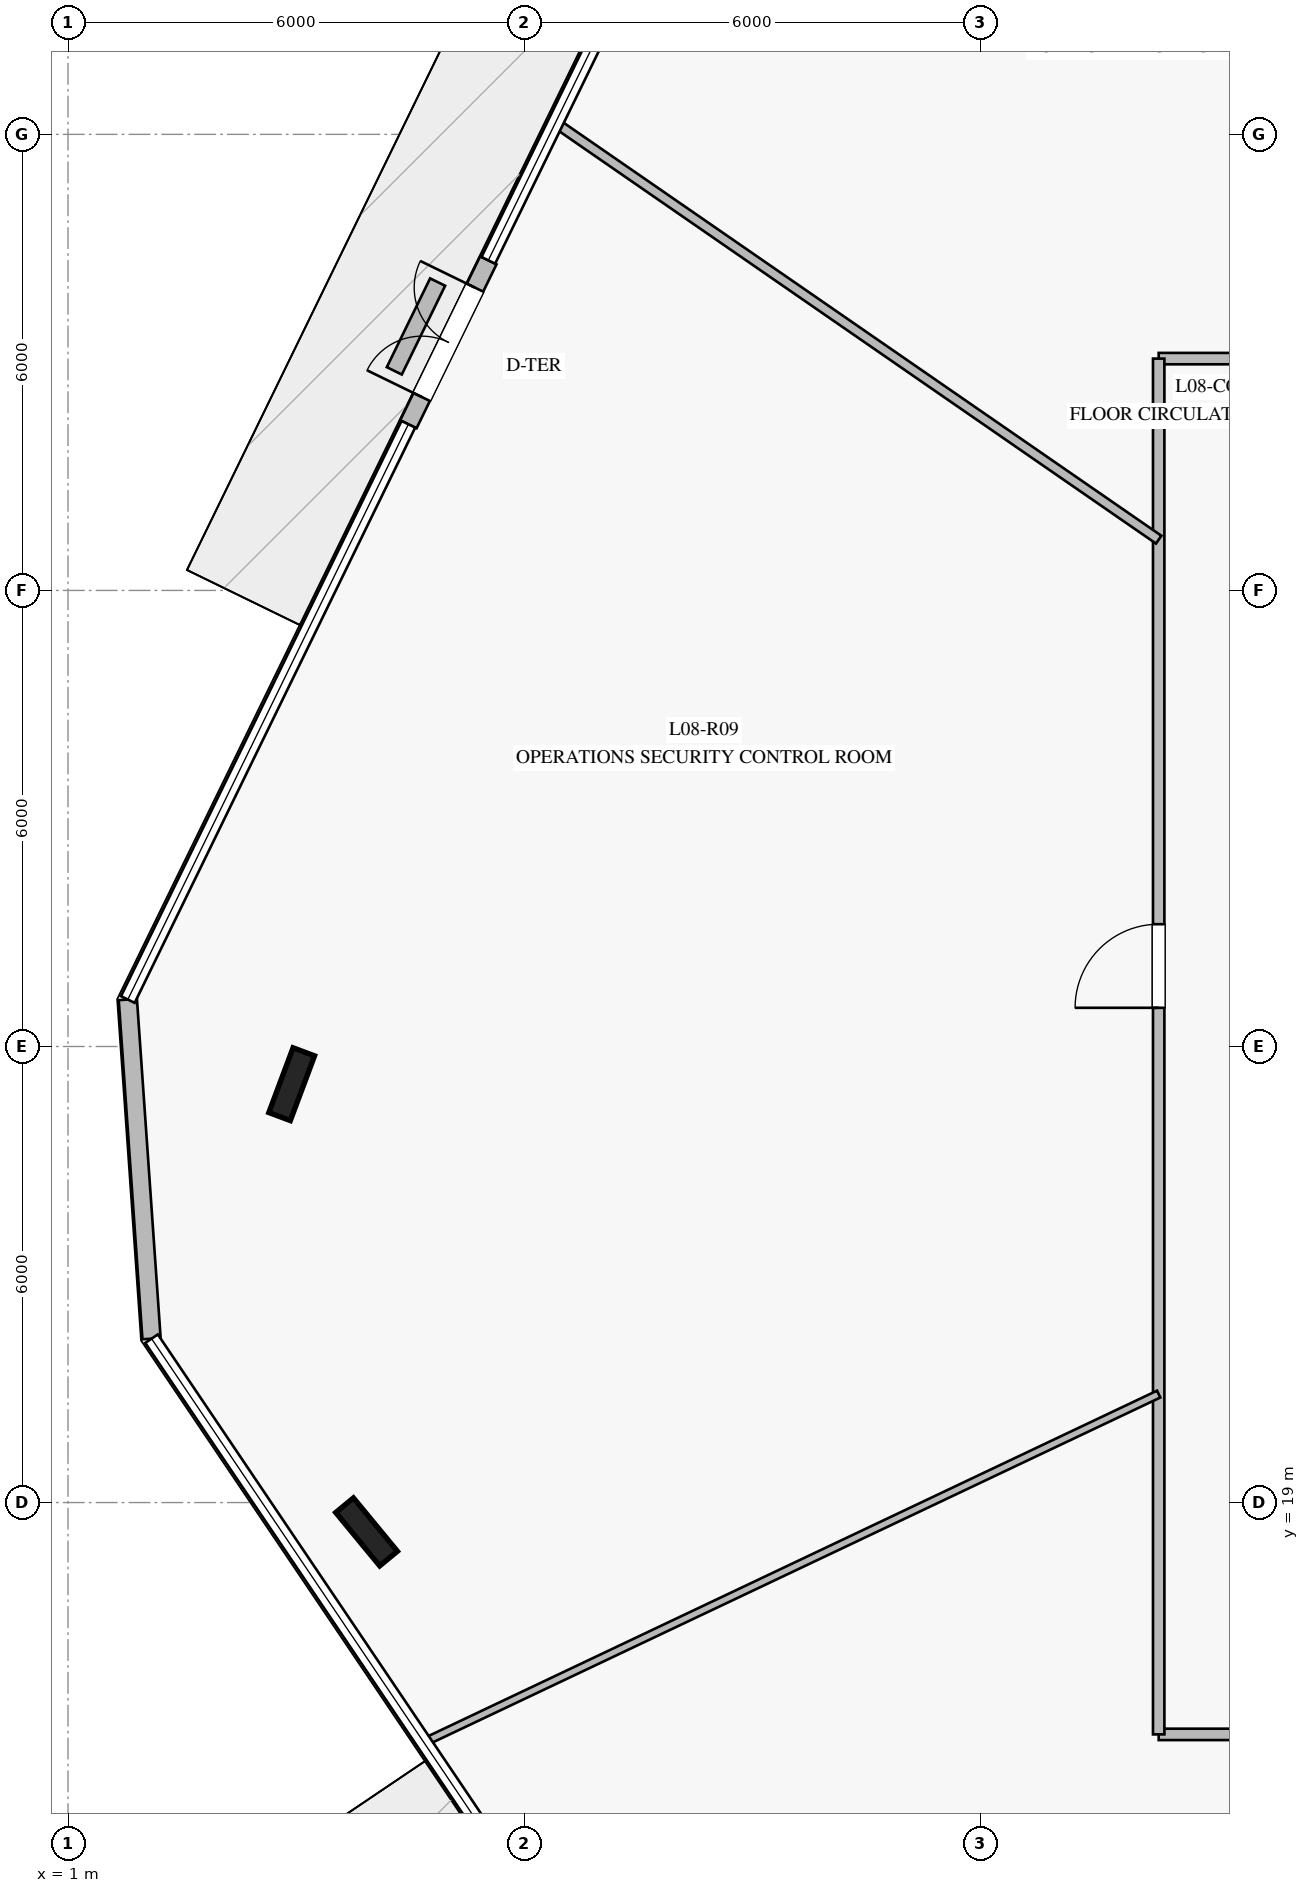
"""IFC4 building model, lengths in metres.
Left out: names, types, materials, properties, quantities, classifications, styles, units other than length and angle.
Written with IfcOpenShell. Run it as: python <this file> out.ifc"""

import sys

from ifc_helpers import new_model, si_unit, direction, frame, frame_2d, origin, origin_2d, place, context, subcontext, project, spatial, rectangle, i_section, extrude, element, fill, save


model = new_model("IFC4")
c1 = context("Model", 3, precision=1e-05, world=origin(), true_north=direction((0.0, 1.0)))
c2 = subcontext(c1, "Body", "Model", "MODEL_VIEW")
j1 = project(units=[si_unit("LENGTHUNIT", "METRE"), si_unit("PLANEANGLEUNIT", "RADIAN")], contexts=[c1])
p1 = place(None, origin())
s1 = spatial("IfcSite", under=j1, at=p1, CompositionType="ELEMENT")
p2 = place(p1, origin())
s2 = spatial("IfcBuilding", under=s1, at=p2, CompositionType="ELEMENT")
p3 = place(p2, frame((0.0, 0.0, 36.0)))
s3 = spatial("IfcBuildingStorey", under=s2, at=p3, CompositionType="ELEMENT", Elevation=36.0)
for number, where, z_axis, x_axis in (
    (1, (3.943, 24.504, 0.0), (0.0, 0.0, 1.0), (0.35, 0.937, 0.0)),
    (2, (4.928, 18.614, 0.0), (0.0, 0.0, 1.0), (-0.636, 0.772, 0.0)),
):
    element("IfcColumn", number, at=place(p3, frame(where, z_axis=z_axis, x_axis=x_axis)), inside=s3, PredefinedType="COLUMN", context=c2, shape_type="SweptSolid", body=[
        extrude(i_section(OverallWidth=0.302, OverallDepth=0.91, WebThickness=0.021, FlangeThickness=0.04, at=origin_2d()), origin(), (0.0, 0.0, 1.0), 4.0),
    ])
p4 = place(p3, frame((6.53, 35.343, 0.0), z_axis=(0.0, 0.0, 1.0), x_axis=(-0.438361496965, -0.898798752769, 0.0)))
e3 = element("IfcWall", 3, at=p4, inside=s3, PredefinedType="STANDARD", context=c2, shape_type="SweptSolid", body=[
    extrude(rectangle(XDim=2.4, YDim=0.24, at=frame_2d((1.2, 0.0))), origin(), (0.0, 0.0, 1.0), 3.76),
])
p5 = place(p4, frame((0.4, 0.0, 0.0)))
e4 = element("IfcOpeningElement", 4, at=p5, cuts=e3, PredefinedType="OPENING", context=c2, shape_type="SweptSolid", body=[
    extrude(rectangle(XDim=1.6, YDim=2.25, at=frame_2d((0.8, 1.125))), frame((0.0, 0.13, 0.0), z_axis=(0.0, -1.0, 0.0), x_axis=(1.0, 0.0, 0.0)), (0.0, 0.0, 1.0), 0.26),
])
p6 = place(p3, frame((1.787, 25.618, 0.0), z_axis=(0.0, 0.0, 1.0), x_axis=(0.069757428916, -0.997563983467, 0.0)))
e5 = element("IfcWall", 5, at=p6, inside=s3, PredefinedType="STANDARD", context=c2, shape_type="SweptSolid", body=[
    extrude(rectangle(XDim=4.473, YDim=0.24, at=frame_2d((2.236, 0.0))), origin(), (0.0, 0.0, 1.0), 3.76),
])
p7 = place(p3, frame((5.863, 35.057, 0.0), z_axis=(0.0, 0.0, 1.0), x_axis=(-0.438627176406, -0.898669127164, 0.0)))
e6 = element("IfcWall", 6, at=p7, inside=s3, PredefinedType="USERDEFINED", context=c2, shape_type="SweptSolid", body=[
    extrude(rectangle(XDim=1.3, YDim=0.22, at=frame_2d((0.65, 0.0))), origin(), (0.0, 0.0, 1.0), 0.4),
])
p8 = place(p3, frame((15.35, 34.05, 0.0), z_axis=(0.0, 0.0, 1.0), x_axis=(1.0, 0.0, 0.0)))
e7 = element("IfcWall", 7, at=p8, inside=s3, PredefinedType="PARTITIONING", context=c2, shape_type="SweptSolid", body=[
    extrude(rectangle(XDim=19.3, YDim=0.15, at=frame_2d((9.65, 0.0))), origin(), (0.0, 0.0, 1.0), 3.21),
])
p9 = place(p8, frame((12.369, 0.0, 0.0)))
e8 = element("IfcOpeningElement", 8, at=p9, cuts=e7, PredefinedType="OPENING", context=c2, shape_type="SweptSolid", body=[
    extrude(rectangle(XDim=1.1, YDim=2.2, at=frame_2d((0.55, 1.1))), frame((0.0, 0.085, 0.0), z_axis=(0.0, -1.0, 0.0), x_axis=(1.0, 0.0, 0.0)), (0.0, 0.0, 1.0), 0.17),
])
p10 = place(p8, frame((3.347, 0.0, 0.0)))
e9 = element("IfcOpeningElement", 9, at=p10, cuts=e7, PredefinedType="OPENING", context=c2, shape_type="SweptSolid", body=[
    extrude(rectangle(XDim=1.1, YDim=2.2, at=frame_2d((0.55, 1.1))), frame((0.0, 0.085, 0.0), z_axis=(0.0, -1.0, 0.0), x_axis=(1.0, 0.0, 0.0)), (0.0, 0.0, 1.0), 0.17),
])
p11 = place(p3, frame((34.65, 15.95, 0.0), z_axis=(0.0, 0.0, 1.0), x_axis=(-1.0, 0.0, 0.0)))
e10 = element("IfcWall", 10, at=p11, inside=s3, PredefinedType="PARTITIONING", context=c2, shape_type="SweptSolid", body=[
    extrude(rectangle(XDim=19.3, YDim=0.15, at=frame_2d((9.65, 0.0))), origin(), (0.0, 0.0, 1.0), 3.21),
])
p12 = place(p11, frame((14.112, 0.0, 0.0)))
e11 = element("IfcOpeningElement", 11, at=p12, cuts=e10, PredefinedType="OPENING", context=c2, shape_type="SweptSolid", body=[
    extrude(rectangle(XDim=1.1, YDim=2.2, at=frame_2d((0.55, 1.1))), frame((0.0, 0.085, 0.0), z_axis=(0.0, -1.0, 0.0), x_axis=(1.0, 0.0, 0.0)), (0.0, 0.0, 1.0), 0.17),
])
p13 = place(p11, frame((4.829, 0.0, 0.0)))
e12 = element("IfcOpeningElement", 12, at=p13, cuts=e10, PredefinedType="OPENING", context=c2, shape_type="SweptSolid", body=[
    extrude(rectangle(XDim=1.1, YDim=2.2, at=frame_2d((0.55, 1.1))), frame((0.0, 0.085, 0.0), z_axis=(0.0, -1.0, 0.0), x_axis=(1.0, 0.0, 0.0)), (0.0, 0.0, 1.0), 0.17),
])
p14 = place(p3, frame((15.35, 15.95, 0.0), z_axis=(0.0, 0.0, 1.0), x_axis=(0.0, 1.0, 0.0)))
e13 = element("IfcWall", 13, at=p14, inside=s3, PredefinedType="PARTITIONING", context=c2, shape_type="SweptSolid", body=[
    extrude(rectangle(XDim=18.1, YDim=0.15, at=frame_2d((9.05, 0.0))), origin(), (0.0, 0.0, 1.0), 3.21),
])
p15 = place(p14, frame((9.559, 0.0, 0.0)))
e14 = element("IfcOpeningElement", 14, at=p15, cuts=e13, PredefinedType="OPENING", context=c2, shape_type="SweptSolid", body=[
    extrude(rectangle(XDim=1.1, YDim=2.2, at=frame_2d((0.55, 1.1))), frame((0.0, 0.085, 0.0), z_axis=(0.0, -1.0, 0.0), x_axis=(1.0, 0.0, 0.0)), (0.0, 0.0, 1.0), 0.17),
])
p16 = place(p3, frame((15.35, 31.668, 0.0), z_axis=(0.0, 0.0, 1.0), x_axis=(-0.822731200349, 0.568430621952, 0.0)))
e15 = element("IfcWall", 15, at=p16, inside=s3, PredefinedType="PARTITIONING", context=c2, shape_type="SweptSolid", body=[
    extrude(rectangle(XDim=9.63, YDim=0.125, at=frame_2d((4.815, 0.0))), origin(), (0.0, 0.0, 1.0), 3.06),
])
p17 = place(p3, frame((15.35, 20.427, 0.0), z_axis=(0.0, 0.0, 1.0), x_axis=(-0.90363263024, -0.428308381385, 0.0)))
e16 = element("IfcWall", 16, at=p17, inside=s3, PredefinedType="MOVABLE", context=c2, shape_type="SweptSolid", body=[
    extrude(rectangle(XDim=10.681, YDim=0.1, at=frame_2d((5.341, 0.0))), origin(), (0.0, 0.0, 1.0), 3.06),
])
p18 = place(p5, frame((1.6, 0.0, 0.0), z_axis=(0.0, 0.0, 1.0), x_axis=(-1.0, 0.0, 0.0)))
e17 = element("IfcDoor", 17, at=p18, inside=s3, OperationType="DOUBLE_DOOR_SINGLE_SWING", PredefinedType="DOOR", context=c2, shape_type="SweptSolid", body=[
    extrude(rectangle(XDim=1.6, YDim=2.25, at=frame_2d((0.8, 1.125))), frame((0.0, 0.025, 0.0), z_axis=(0.0, -1.0, 0.0), x_axis=(1.0, 0.0, 0.0)), (0.0, 0.0, 1.0), 0.05),
])
fill(e4, e17)
p19 = place(p15, origin())
e18 = element("IfcDoor", 18, at=p19, inside=s3, OperationType="SINGLE_SWING_LEFT", PredefinedType="DOOR", context=c2, shape_type="SweptSolid", body=[
    extrude(rectangle(XDim=1.1, YDim=2.2, at=frame_2d((0.55, 1.1))), frame((0.0, 0.025, 0.0), z_axis=(0.0, -1.0, 0.0), x_axis=(1.0, 0.0, 0.0)), (0.0, 0.0, 1.0), 0.05),
])
fill(e14, e18)
save(model, sys.argv[1])
